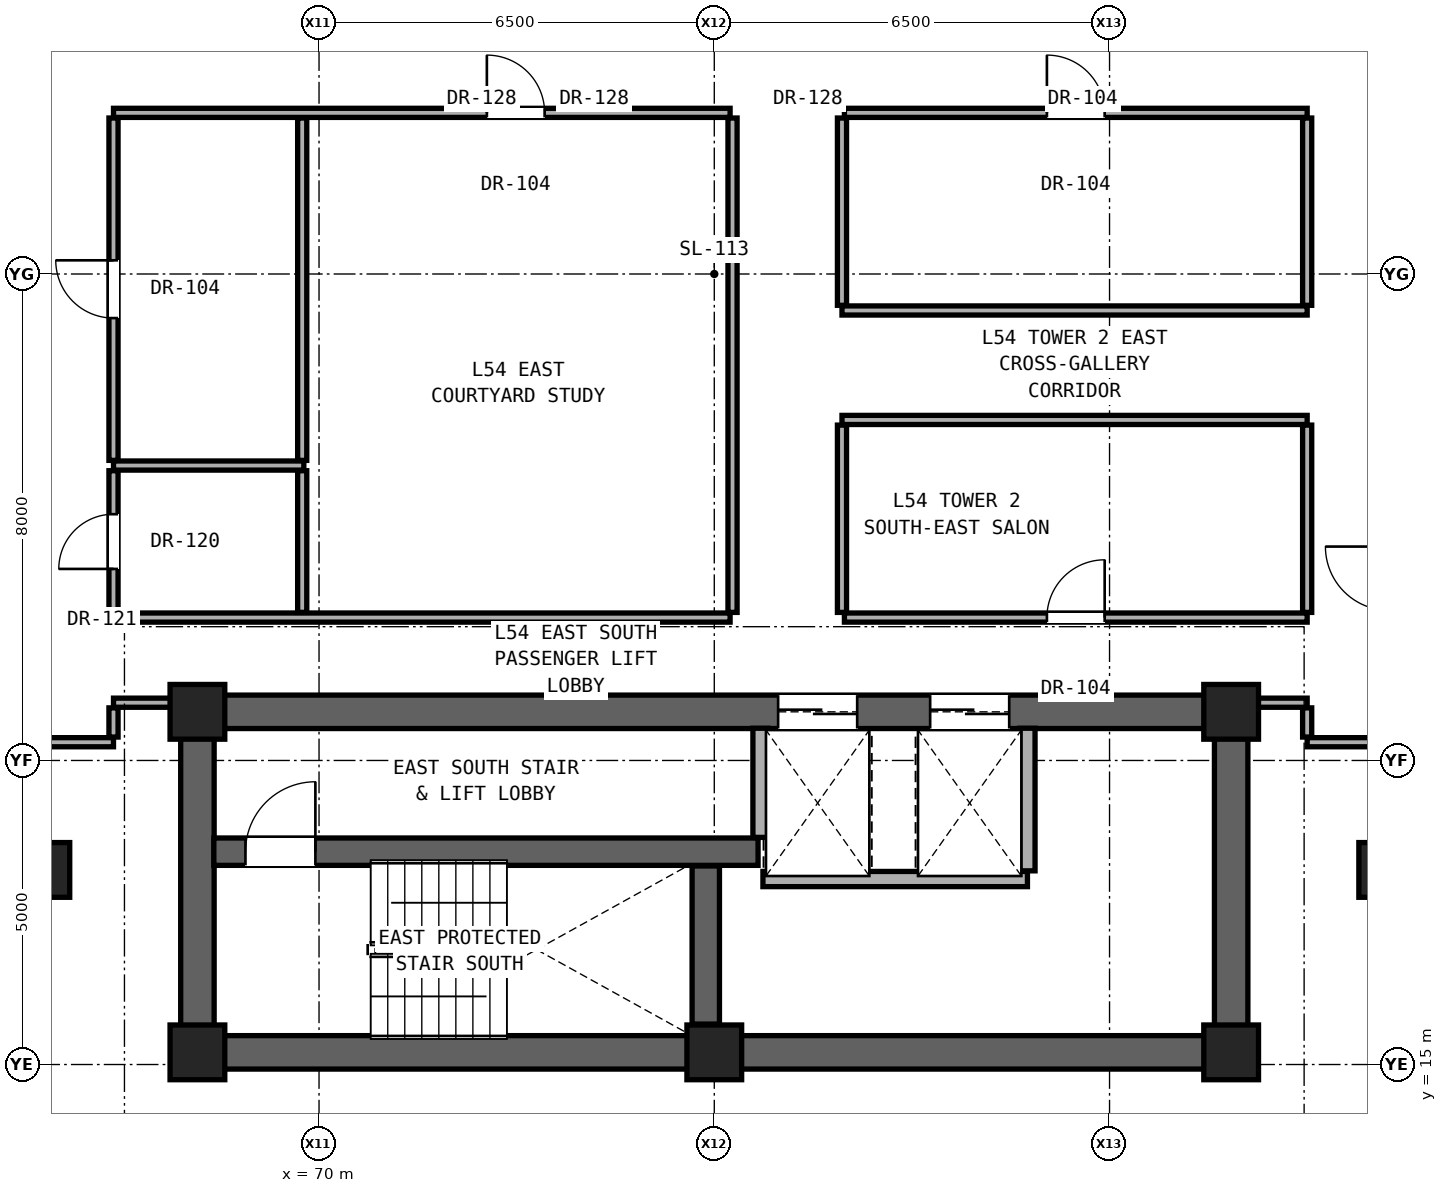
"""IFC4 building model, lengths in metres.
Left out: names, types, materials, properties, quantities, classifications, styles, units other than length and angle.
Written with IfcOpenShell. Run it as: python <this file> out.ifc"""

import sys

from ifc_helpers import new_model, si_unit, direction, frame, frame_2d, origin, origin_2d, place, context, subcontext, project, spatial, rectangle, extrude, element, fill, save


model = new_model("IFC4")
c1 = context("Model", 3, precision=1e-05, world=origin(), true_north=direction((0.0, 1.0)))
c2 = subcontext(c1, "Body", "Model", "MODEL_VIEW")
j1 = project(units=[si_unit("LENGTHUNIT", "METRE"), si_unit("PLANEANGLEUNIT", "RADIAN")], contexts=[c1])
p1 = place(None, origin())
s1 = spatial("IfcSite", under=j1, at=p1, CompositionType="ELEMENT")
p2 = place(p1, origin())
s2 = spatial("IfcBuilding", under=s1, at=p2, CompositionType="ELEMENT")
p3 = place(p2, frame((0.0, 0.0, 190.15)))
s3 = spatial("IfcBuildingStorey", under=s2, at=p3, CompositionType="ELEMENT", Elevation=190.15)
for number, where, z_axis, x_axis in (
    (1, (68.0, 15.2, 0.0), (0.0, 0.0, 1.0), (1.0, 0.0, 0.0)),
    (2, (76.5, 15.2, 0.0), (0.0, 0.0, 1.0), (1.0, 0.0, 0.0)),
    (3, (85.0, 15.2, 0.0), (0.0, 0.0, 1.0), (1.0, 0.0, 0.0)),
    (4, (68.0, 20.8, 0.0), (0.0, 0.0, 1.0), (1.0, 0.0, 0.0)),
    (5, (85.0, 20.8, 0.0), (0.0, 0.0, 1.0), (1.0, 0.0, 0.0)),
):
    element("IfcColumn", number, at=place(p3, frame(where, z_axis=z_axis, x_axis=x_axis)), inside=s3, PredefinedType="COLUMN", context=c2, shape_type="SweptSolid", body=[
        extrude(rectangle(XDim=0.9, YDim=0.9, at=origin_2d()), origin(), (0.0, 0.0, 1.0), 3.25),
    ])
for number, where, z_axis, x_axis in (
    (6, (65.6, 18.2, 0.0), (0.0, 0.0, 1.0), (1.0, 0.0, 0.0)),
    (7, (87.4, 18.2, 0.0), (0.0, 0.0, 1.0), (1.0, 0.0, 0.0)),
):
    element("IfcColumn", number, at=place(p3, frame(where, z_axis=z_axis, x_axis=x_axis)), inside=s3, PredefinedType="PILASTER", context=c2, shape_type="SweptSolid", body=[
        extrude(rectangle(XDim=0.6, YDim=0.9, at=origin_2d()), origin(), (0.0, 0.0, 1.0), 3.25),
    ])
p4 = place(p3, frame((68.0, 15.2, 0.0), z_axis=(0.0, 0.0, 1.0), x_axis=(1.0, 0.0, 0.0)))
e8 = element("IfcWall", 8, at=p4, inside=s3, PredefinedType="SHEAR", context=c2, shape_type="SweptSolid", body=[
    extrude(rectangle(XDim=17.0, YDim=0.55, at=frame_2d((8.5, 0.0))), origin(), (0.0, 0.0, 1.0), 3.05),
])
for number, where, z_axis, x_axis in (
    (9, (68.0, 15.2, 0.0), (0.0, 0.0, 1.0), (0.0, 1.0, 0.0)),
    (10, (85.0, 15.2, 0.0), (0.0, 0.0, 1.0), (0.0, 1.0, 0.0)),
):
    element("IfcWall", number, at=place(p3, frame(where, z_axis=z_axis, x_axis=x_axis)), inside=s3, PredefinedType="SHEAR", context=c2, shape_type="SweptSolid", body=[
        extrude(rectangle(XDim=5.6, YDim=0.55, at=frame_2d((2.8, 0.0))), origin(), (0.0, 0.0, 1.0), 3.05),
    ])
p5 = place(p3, frame((68.0, 20.8, 0.0), z_axis=(0.0, 0.0, 1.0), x_axis=(1.0, 0.0, 0.0)))
e11 = element("IfcWall", 11, at=p5, inside=s3, PredefinedType="SHEAR", context=c2, shape_type="SweptSolid", body=[
    extrude(rectangle(XDim=17.0, YDim=0.55, at=frame_2d((8.5, 0.0))), origin(), (0.0, 0.0, 1.0), 3.05),
])
p6 = place(p5, frame((9.55, 0.0, 0.0)))
e12 = element("IfcOpeningElement", 12, at=p6, cuts=e11, PredefinedType="OPENING", context=c2, shape_type="SweptSolid", body=[
    extrude(rectangle(XDim=1.3, YDim=2.3, at=frame_2d((0.65, 1.15))), frame((0.0, 0.285, 0.0), z_axis=(0.0, -1.0, 0.0), x_axis=(1.0, 0.0, 0.0)), (0.0, 0.0, 1.0), 0.57),
])
p7 = place(p5, frame((12.05, 0.0, 0.0)))
e13 = element("IfcOpeningElement", 13, at=p7, cuts=e11, PredefinedType="OPENING", context=c2, shape_type="SweptSolid", body=[
    extrude(rectangle(XDim=1.3, YDim=2.3, at=frame_2d((0.65, 1.15))), frame((0.0, 0.285, 0.0), z_axis=(0.0, -1.0, 0.0), x_axis=(1.0, 0.0, 0.0)), (0.0, 0.0, 1.0), 0.57),
])
p8 = place(p3, frame((77.3, 18.05, 0.0), z_axis=(0.0, 0.0, 1.0), x_axis=(1.0, 0.0, 0.0)))
e14 = element("IfcWall", 14, at=p8, inside=s3, PredefinedType="SOLIDWALL", context=c2, shape_type="SweptSolid", body=[
    extrude(rectangle(XDim=4.35, YDim=0.25, at=frame_2d((2.175, 0.0))), origin(), (0.0, 0.0, 1.0), 3.05),
])
p9 = place(p3, frame((68.27, 18.5, 0.0), z_axis=(0.0, 0.0, 1.0), x_axis=(1.0, 0.0, 0.0)))
e15 = element("IfcWall", 15, at=p9, inside=s3, PredefinedType="SHEAR", context=c2, shape_type="SweptSolid", body=[
    extrude(rectangle(XDim=8.95, YDim=0.45, at=frame_2d((4.475, 0.0))), origin(), (0.0, 0.0, 1.0), 3.05),
])
p10 = place(p9, frame((0.52, 0.0, 0.0)))
e16 = element("IfcOpeningElement", 16, at=p10, cuts=e15, PredefinedType="OPENING", context=c2, shape_type="SweptSolid", body=[
    extrude(rectangle(XDim=1.15, YDim=2.2, at=frame_2d((0.575, 1.1))), frame((0.0, 0.235, 0.0), z_axis=(0.0, -1.0, 0.0), x_axis=(1.0, 0.0, 0.0)), (0.0, 0.0, 1.0), 0.47),
])
p11 = place(p3, frame((65.25, 20.3, 0.0), z_axis=(0.0, 0.0, 1.0), x_axis=(1.0, 0.0, 0.0)))
e17 = element("IfcWall", 17, at=p11, inside=s3, PredefinedType="PARTITIONING", context=c2, shape_type="SweptSolid", body=[
    extrude(rectangle(XDim=1.37, YDim=0.15, at=frame_2d((0.685, 0.0))), origin(), (0.0, 0.0, 1.0), 3.05),
])
p12 = place(p3, frame((86.25, 20.3, 0.0), z_axis=(0.0, 0.0, 1.0), x_axis=(1.0, 0.0, 0.0)))
e18 = element("IfcWall", 18, at=p12, inside=s3, PredefinedType="PARTITIONING", context=c2, shape_type="SweptSolid", body=[
    extrude(rectangle(XDim=1.35, YDim=0.15, at=frame_2d((0.675, 0.0))), origin(), (0.0, 0.0, 1.0), 3.05),
])
p13 = place(p3, frame((66.62, 20.95, 0.0), z_axis=(0.0, 0.0, 1.0), x_axis=(1.0, 0.0, 0.0)))
e19 = element("IfcWall", 19, at=p13, inside=s3, PredefinedType="PARTITIONING", context=c2, shape_type="SweptSolid", body=[
    extrude(rectangle(XDim=1.11, YDim=0.15, at=frame_2d((0.555, 0.0))), origin(), (0.0, 0.0, 1.0), 2.442),
])
p14 = place(p3, frame((85.27, 20.95, 0.0), z_axis=(0.0, 0.0, 1.0), x_axis=(1.0, 0.0, 0.0)))
e20 = element("IfcWall", 20, at=p14, inside=s3, PredefinedType="PARTITIONING", context=c2, shape_type="SweptSolid", body=[
    extrude(rectangle(XDim=0.98, YDim=0.15, at=frame_2d((0.49, 0.0))), origin(), (0.0, 0.0, 1.0), 2.442),
])
p15 = place(p3, frame((66.62, 22.35, 0.0), z_axis=(0.0, 0.0, 1.0), x_axis=(1.0, 0.0, 0.0)))
e21 = element("IfcWall", 21, at=p15, inside=s3, PredefinedType="PARTITIONING", context=c2, shape_type="SweptSolid", body=[
    extrude(rectangle(XDim=10.14, YDim=0.15, at=frame_2d((5.07, 0.0))), origin(), (0.0, 0.0, 1.0), 2.186),
])
p16 = place(p3, frame((78.64, 22.35, 0.0), z_axis=(0.0, 0.0, 1.0), x_axis=(1.0, 0.0, 0.0)))
e22 = element("IfcWall", 22, at=p16, inside=s3, PredefinedType="PARTITIONING", context=c2, shape_type="SweptSolid", body=[
    extrude(rectangle(XDim=7.61, YDim=0.15, at=frame_2d((3.805, 0.0))), origin(), (0.0, 0.0, 1.0), 2.186),
])
p17 = place(p16, frame((3.33, 0.0, 0.0)))
e23 = element("IfcOpeningElement", 23, at=p17, cuts=e22, PredefinedType="OPENING", context=c2, shape_type="SweptSolid", body=[
    extrude(rectangle(XDim=0.95, YDim=2.15, at=frame_2d((0.475, 1.075))), frame((0.0, 0.085, 0.0), z_axis=(0.0, -1.0, 0.0), x_axis=(1.0, 0.0, 0.0)), (0.0, 0.0, 1.0), 0.17),
])
p18 = place(p3, frame((66.62, 24.85, 0.0), z_axis=(0.0, 0.0, 1.0), x_axis=(1.0, 0.0, 0.0)))
e24 = element("IfcWall", 24, at=p18, inside=s3, PredefinedType="PARTITIONING", context=c2, shape_type="SweptSolid", body=[
    extrude(rectangle(XDim=3.13, YDim=0.15, at=frame_2d((1.565, 0.0))), origin(), (0.0, 0.0, 1.0), 2.186),
])
for number, where, z_axis, x_axis in (
    (25, (78.6, 25.6, 0.0), (0.0, 0.0, 1.0), (1.0, 0.0, 0.0)),
    (26, (78.6, 27.4, 0.0), (0.0, 0.0, 1.0), (1.0, 0.0, 0.0)),
):
    element("IfcWall", number, at=place(p3, frame(where, z_axis=z_axis, x_axis=x_axis)), inside=s3, PredefinedType="PARTITIONING", context=c2, shape_type="SweptSolid", body=[
        extrude(rectangle(XDim=7.65, YDim=0.15, at=frame_2d((3.825, 0.0))), origin(), (0.0, 0.0, 1.0), 2.186),
    ])
p19 = place(p3, frame((66.62, 30.65, 0.0), z_axis=(0.0, 0.0, 1.0), x_axis=(1.0, 0.0, 0.0)))
e27 = element("IfcWall", 27, at=p19, inside=s3, PredefinedType="PARTITIONING", context=c2, shape_type="SweptSolid", body=[
    extrude(rectangle(XDim=10.14, YDim=0.15, at=frame_2d((5.07, 0.0))), origin(), (0.0, 0.0, 1.0), 2.186),
])
p20 = place(p19, frame((6.14, 0.0, 0.0)))
e28 = element("IfcOpeningElement", 28, at=p20, cuts=e27, PredefinedType="OPENING", context=c2, shape_type="SweptSolid", body=[
    extrude(rectangle(XDim=0.95, YDim=2.15, at=frame_2d((0.475, 1.075))), frame((0.0, 0.085, 0.0), z_axis=(0.0, -1.0, 0.0), x_axis=(1.0, 0.0, 0.0)), (0.0, 0.0, 1.0), 0.17),
])
p21 = place(p3, frame((78.64, 30.65, 0.0), z_axis=(0.0, 0.0, 1.0), x_axis=(1.0, 0.0, 0.0)))
e29 = element("IfcWall", 29, at=p21, inside=s3, PredefinedType="PARTITIONING", context=c2, shape_type="SweptSolid", body=[
    extrude(rectangle(XDim=7.61, YDim=0.15, at=frame_2d((3.805, 0.0))), origin(), (0.0, 0.0, 1.0), 2.186),
])
p22 = place(p21, frame((3.33, 0.0, 0.0)))
e30 = element("IfcOpeningElement", 30, at=p22, cuts=e29, PredefinedType="OPENING", context=c2, shape_type="SweptSolid", body=[
    extrude(rectangle(XDim=0.95, YDim=2.15, at=frame_2d((0.475, 1.075))), frame((0.0, 0.085, 0.0), z_axis=(0.0, -1.0, 0.0), x_axis=(1.0, 0.0, 0.0)), (0.0, 0.0, 1.0), 0.17),
])
p23 = place(p3, frame((66.62, 20.385, 0.0), z_axis=(0.0, 0.0, 1.0), x_axis=(0.0, 1.0, 0.0)))
e31 = element("IfcWall", 31, at=p23, inside=s3, PredefinedType="PARTITIONING", context=c2, shape_type="SweptSolid", body=[
    extrude(rectangle(XDim=0.48, YDim=0.15, at=frame_2d((0.24, 0.0))), origin(), (0.0, 0.0, 1.0), 2.442),
])
p24 = place(p3, frame((66.62, 22.435, 0.0), z_axis=(0.0, 0.0, 1.0), x_axis=(0.0, 1.0, 0.0)))
e32 = element("IfcWall", 32, at=p24, inside=s3, PredefinedType="PARTITIONING", context=c2, shape_type="SweptSolid", body=[
    extrude(rectangle(XDim=2.33, YDim=0.15, at=frame_2d((1.165, 0.0))), origin(), (0.0, 0.0, 1.0), 3.05),
])
p25 = place(p24, frame((0.715, 0.0, 0.0)))
e33 = element("IfcOpeningElement", 33, at=p25, cuts=e32, PredefinedType="OPENING", context=c2, shape_type="SweptSolid", body=[
    extrude(rectangle(XDim=0.9, YDim=2.1, at=frame_2d((0.45, 1.05))), frame((0.0, 0.085, 0.0), z_axis=(0.0, -1.0, 0.0), x_axis=(1.0, 0.0, 0.0)), (0.0, 0.0, 1.0), 0.17),
])
p26 = place(p3, frame((66.62, 24.935, 0.0), z_axis=(0.0, 0.0, 1.0), x_axis=(0.0, 1.0, 0.0)))
e34 = element("IfcWall", 34, at=p26, inside=s3, PredefinedType="PARTITIONING", context=c2, shape_type="SweptSolid", body=[
    extrude(rectangle(XDim=5.63, YDim=0.15, at=frame_2d((2.815, 0.0))), origin(), (0.0, 0.0, 1.0), 2.346),
])
p27 = place(p26, frame((2.34, 0.0, 0.0)))
e35 = element("IfcOpeningElement", 35, at=p27, cuts=e34, PredefinedType="OPENING", context=c2, shape_type="SweptSolid", body=[
    extrude(rectangle(XDim=0.95, YDim=2.15, at=frame_2d((0.475, 1.075))), frame((0.0, 0.085, 0.0), z_axis=(0.0, -1.0, 0.0), x_axis=(1.0, 0.0, 0.0)), (0.0, 0.0, 1.0), 0.17),
])
p28 = place(p3, frame((69.723, 22.435, 0.0), z_axis=(0.0, 0.0, 1.0), x_axis=(0.0, 1.0, 0.0)))
e36 = element("IfcWall", 36, at=p28, inside=s3, PredefinedType="PARTITIONING", context=c2, shape_type="SweptSolid", body=[
    extrude(rectangle(XDim=2.33, YDim=0.15, at=frame_2d((1.165, 0.0))), origin(), (0.0, 0.0, 1.0), 3.05),
])
p29 = place(p3, frame((69.723, 24.935, 0.0), z_axis=(0.0, 0.0, 1.0), x_axis=(0.0, 1.0, 0.0)))
e37 = element("IfcWall", 37, at=p29, inside=s3, PredefinedType="PARTITIONING", context=c2, shape_type="SweptSolid", body=[
    extrude(rectangle(XDim=5.63, YDim=0.15, at=frame_2d((2.815, 0.0))), origin(), (0.0, 0.0, 1.0), 2.186),
])
p30 = place(p3, frame((76.36, 15.665, 0.0), z_axis=(0.0, 0.0, 1.0), x_axis=(0.0, 1.0, 0.0)))
e38 = element("IfcWall", 38, at=p30, inside=s3, PredefinedType="SHEAR", context=c2, shape_type="SweptSolid", body=[
    extrude(rectangle(XDim=2.6, YDim=0.45, at=frame_2d((1.3, 0.0))), origin(), (0.0, 0.0, 1.0), 3.05),
])
p31 = place(p3, frame((76.8, 22.435, 0.0), z_axis=(0.0, 0.0, 1.0), x_axis=(0.0, 1.0, 0.0)))
e39 = element("IfcWall", 39, at=p31, inside=s3, PredefinedType="PARTITIONING", context=c2, shape_type="SweptSolid", body=[
    extrude(rectangle(XDim=8.13, YDim=0.15, at=frame_2d((4.065, 0.0))), origin(), (0.0, 0.0, 1.0), 2.186),
])
p32 = place(p3, frame((77.26, 18.735, 0.0), z_axis=(0.0, 0.0, 1.0), x_axis=(0.0, 1.0, 0.0)))
e40 = element("IfcWall", 40, at=p32, inside=s3, PredefinedType="SOLIDWALL", context=c2, shape_type="SweptSolid", body=[
    extrude(rectangle(XDim=1.795, YDim=0.25, at=frame_2d((0.897, 0.0))), origin(), (0.0, 0.0, 1.0), 3.05),
])
p33 = place(p3, frame((78.6, 22.435, 0.0), z_axis=(0.0, 0.0, 1.0), x_axis=(0.0, 1.0, 0.0)))
e41 = element("IfcWall", 41, at=p33, inside=s3, PredefinedType="PARTITIONING", context=c2, shape_type="SweptSolid", body=[
    extrude(rectangle(XDim=3.08, YDim=0.15, at=frame_2d((1.54, 0.0))), origin(), (0.0, 0.0, 1.0), 3.05),
])
p34 = place(p3, frame((78.6, 27.485, 0.0), z_axis=(0.0, 0.0, 1.0), x_axis=(0.0, 1.0, 0.0)))
e42 = element("IfcWall", 42, at=p34, inside=s3, PredefinedType="PARTITIONING", context=c2, shape_type="SweptSolid", body=[
    extrude(rectangle(XDim=3.08, YDim=0.15, at=frame_2d((1.54, 0.0))), origin(), (0.0, 0.0, 1.0), 2.186),
])
p35 = place(p3, frame((81.65, 18.185, 0.0), z_axis=(0.0, 0.0, 1.0), x_axis=(0.0, 1.0, 0.0)))
e43 = element("IfcWall", 43, at=p35, inside=s3, PredefinedType="SOLIDWALL", context=c2, shape_type="SweptSolid", body=[
    extrude(rectangle(XDim=2.345, YDim=0.25, at=frame_2d((1.172, 0.0))), origin(), (0.0, 0.0, 1.0), 3.05),
])
p36 = place(p3, frame((86.25, 20.385, 0.0), z_axis=(0.0, 0.0, 1.0), x_axis=(0.0, 1.0, 0.0)))
e44 = element("IfcWall", 44, at=p36, inside=s3, PredefinedType="PARTITIONING", context=c2, shape_type="SweptSolid", body=[
    extrude(rectangle(XDim=0.48, YDim=0.15, at=frame_2d((0.24, 0.0))), origin(), (0.0, 0.0, 1.0), 2.442),
])
p37 = place(p3, frame((86.25, 22.435, 0.0), z_axis=(0.0, 0.0, 1.0), x_axis=(0.0, 1.0, 0.0)))
e45 = element("IfcWall", 45, at=p37, inside=s3, PredefinedType="PARTITIONING", context=c2, shape_type="SweptSolid", body=[
    extrude(rectangle(XDim=3.08, YDim=0.15, at=frame_2d((1.54, 0.0))), origin(), (0.0, 0.0, 1.0), 3.05),
])
p38 = place(p3, frame((86.25, 27.485, 0.0), z_axis=(0.0, 0.0, 1.0), x_axis=(0.0, 1.0, 0.0)))
e46 = element("IfcWall", 46, at=p38, inside=s3, PredefinedType="PARTITIONING", context=c2, shape_type="SweptSolid", body=[
    extrude(rectangle(XDim=3.08, YDim=0.15, at=frame_2d((1.54, 0.0))), origin(), (0.0, 0.0, 1.0), 2.346),
])
p39 = place(p10, origin())
e47 = element("IfcDoor", 47, at=p39, inside=s3, OperationType="SINGLE_SWING_RIGHT", PredefinedType="DOOR", context=c2, shape_type="SweptSolid", body=[
    extrude(rectangle(XDim=1.15, YDim=2.2, at=frame_2d((0.575, 1.1))), frame((0.0, 0.025, 0.0), z_axis=(0.0, -1.0, 0.0), x_axis=(1.0, 0.0, 0.0)), (0.0, 0.0, 1.0), 0.05),
])
fill(e16, e47)
p40 = place(p25, origin())
e48 = element("IfcDoor", 48, at=p40, inside=s3, OperationType="SINGLE_SWING_LEFT", PredefinedType="DOOR", context=c2, shape_type="SweptSolid", body=[
    extrude(rectangle(XDim=0.9, YDim=2.1, at=frame_2d((0.45, 1.05))), frame((0.0, 0.025, 0.0), z_axis=(0.0, -1.0, 0.0), x_axis=(1.0, 0.0, 0.0)), (0.0, 0.0, 1.0), 0.05),
])
fill(e33, e48)
p41 = place(p27, origin())
e49 = element("IfcDoor", 49, at=p41, inside=s3, OperationType="SINGLE_SWING_RIGHT", PredefinedType="DOOR", context=c2, shape_type="SweptSolid", body=[
    extrude(rectangle(XDim=0.95, YDim=2.15, at=frame_2d((0.475, 1.075))), frame((0.0, 0.025, 0.0), z_axis=(0.0, -1.0, 0.0), x_axis=(1.0, 0.0, 0.0)), (0.0, 0.0, 1.0), 0.05),
])
fill(e35, e49)
p42 = place(p20, origin())
e50 = element("IfcDoor", 50, at=p42, inside=s3, OperationType="SINGLE_SWING_LEFT", PredefinedType="DOOR", context=c2, shape_type="SweptSolid", body=[
    extrude(rectangle(XDim=0.95, YDim=2.15, at=frame_2d((0.475, 1.075))), frame((0.0, 0.025, 0.0), z_axis=(0.0, -1.0, 0.0), x_axis=(1.0, 0.0, 0.0)), (0.0, 0.0, 1.0), 0.05),
])
fill(e28, e50)
p43 = place(p17, origin())
e51 = element("IfcDoor", 51, at=p43, inside=s3, OperationType="SINGLE_SWING_RIGHT", PredefinedType="DOOR", context=c2, shape_type="SweptSolid", body=[
    extrude(rectangle(XDim=0.95, YDim=2.15, at=frame_2d((0.475, 1.075))), frame((0.0, 0.025, 0.0), z_axis=(0.0, -1.0, 0.0), x_axis=(1.0, 0.0, 0.0)), (0.0, 0.0, 1.0), 0.05),
])
fill(e23, e51)
p44 = place(p22, origin())
e52 = element("IfcDoor", 52, at=p44, inside=s3, OperationType="SINGLE_SWING_LEFT", PredefinedType="DOOR", context=c2, shape_type="SweptSolid", body=[
    extrude(rectangle(XDim=0.95, YDim=2.15, at=frame_2d((0.475, 1.075))), frame((0.0, 0.025, 0.0), z_axis=(0.0, -1.0, 0.0), x_axis=(1.0, 0.0, 0.0)), (0.0, 0.0, 1.0), 0.05),
])
fill(e30, e52)
p45 = place(p6, origin())
e53 = element("IfcDoor", 53, at=p45, inside=s3, OperationType="DOUBLE_DOOR_SLIDING", PredefinedType="DOOR", context=c2, shape_type="SweptSolid", body=[
    extrude(rectangle(XDim=1.3, YDim=2.3, at=frame_2d((0.65, 1.15))), frame((0.0, 0.025, 0.0), z_axis=(0.0, -1.0, 0.0), x_axis=(1.0, 0.0, 0.0)), (0.0, 0.0, 1.0), 0.05),
])
fill(e12, e53)
p46 = place(p7, origin())
e54 = element("IfcDoor", 54, at=p46, inside=s3, OperationType="DOUBLE_DOOR_SLIDING", PredefinedType="DOOR", context=c2, shape_type="SweptSolid", body=[
    extrude(rectangle(XDim=1.3, YDim=2.3, at=frame_2d((0.65, 1.15))), frame((0.0, 0.025, 0.0), z_axis=(0.0, -1.0, 0.0), x_axis=(1.0, 0.0, 0.0)), (0.0, 0.0, 1.0), 0.05),
])
fill(e13, e54)
save(model, sys.argv[1])
